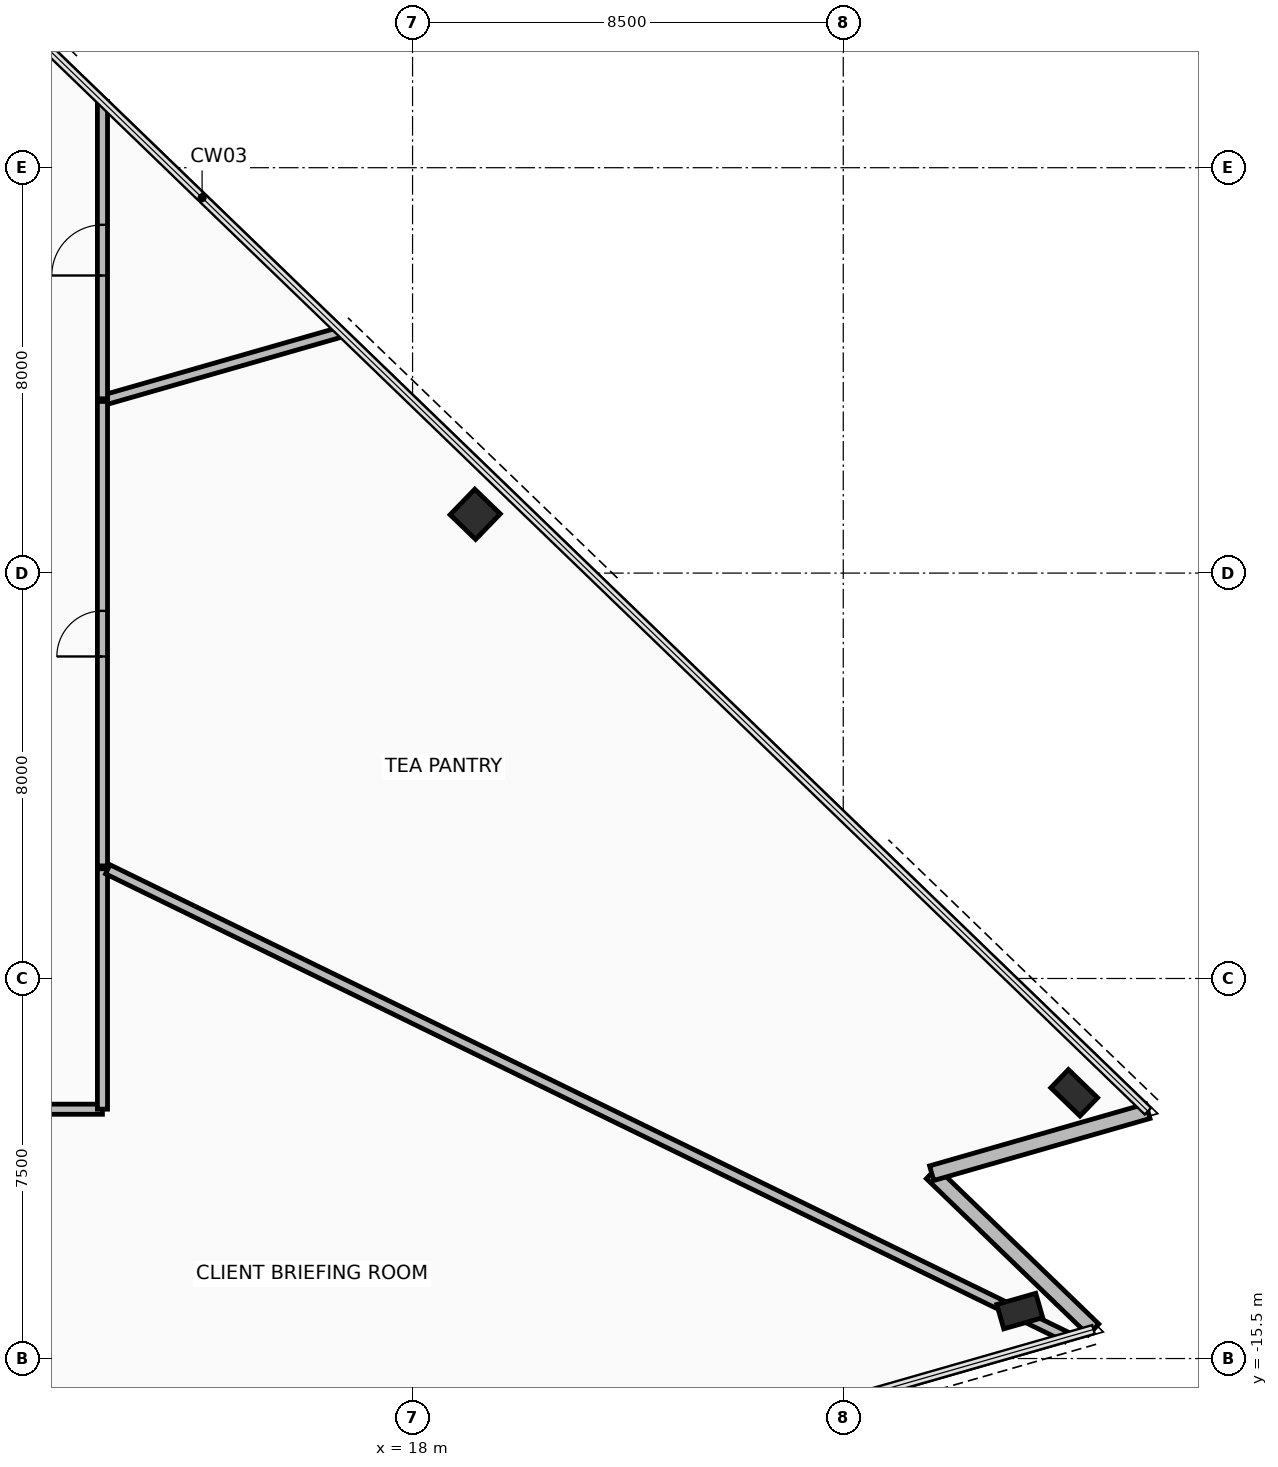
"""IFC4 building model, lengths in metres.
Left out: names, types, materials, properties, quantities, classifications, styles, units other than length and angle.
Written with IfcOpenShell. Run it as: python <this file> out.ifc"""

import sys

from ifc_helpers import new_model, si_unit, direction, frame, frame_2d, origin, origin_2d, place, context, subcontext, project, spatial, rectangle, hollow_rectangle, extrude, element, fill, save


model = new_model("IFC4")
c1 = context("Model", 3, precision=1e-05, world=origin(), true_north=direction((0.0, 1.0)))
c2 = subcontext(c1, "Body", "Model", "MODEL_VIEW")
j1 = project(units=[si_unit("LENGTHUNIT", "METRE"), si_unit("PLANEANGLEUNIT", "RADIAN")], contexts=[c1])
p1 = place(None, origin())
s1 = spatial("IfcSite", under=j1, at=p1, CompositionType="ELEMENT")
p2 = place(p1, origin())
s2 = spatial("IfcBuilding", under=s1, at=p2, CompositionType="ELEMENT")
p3 = place(p2, frame((0.0, 0.0, 86.1)))
s3 = spatial("IfcBuildingStorey", under=s2, at=p3, CompositionType="ELEMENT", Elevation=86.1)
for number, where, z_axis, x_axis in (
    (1, (29.983, -14.564, 0.0), (0.0, 0.0, 1.0), (0.961, 0.276, 0.0)),
    (2, (31.058, -10.256, 0.0), (0.0, 0.0, 1.0), (-0.719, 0.695, 0.0)),
):
    element("IfcColumn", number, at=place(p3, frame(where, z_axis=z_axis, x_axis=x_axis)), inside=s3, PredefinedType="COLUMN", context=c2, shape_type="SweptSolid", body=[
        extrude(hollow_rectangle(XDim=0.5, YDim=0.8, WallThickness=0.04, at=origin_2d()), origin(), (0.0, 0.0, 1.0), 3.6),
    ])
p4 = place(p3, frame((19.236, 1.16, -0.19), z_axis=(0.0, 0.0, 1.0), x_axis=(-0.719339800339, 0.694658370459, 0.0)))
e3 = element("IfcColumn", 3, at=p4, inside=s3, PredefinedType="COLUMN", context=c2, shape_type="SweptSolid", body=[
    extrude(hollow_rectangle(XDim=0.7, YDim=0.7, WallThickness=0.04, at=origin_2d()), origin(), (0.0, 0.0, 1.0), 3.79),
])
p5 = place(p3, frame((31.439, -14.927, 0.0), z_axis=(0.0, 0.0, 1.0), x_axis=(-0.719317126864, 0.694681848763, 0.0)))
e4 = element("IfcWall", 4, at=p5, inside=s3, PredefinedType="STANDARD", context=c2, shape_type="SweptSolid", body=[
    extrude(rectangle(XDim=4.44, YDim=0.3, at=frame_2d((2.22, 0.0))), origin(), (0.0, 0.0, 1.0), 2.605),
])
p6 = place(p3, frame((28.245, -11.842, 0.0), z_axis=(0.0, 0.0, 1.0), x_axis=(0.961255810825, 0.275657878821, 0.0)))
e5 = element("IfcWall", 5, at=p6, inside=s3, PredefinedType="STANDARD", context=c2, shape_type="SweptSolid", body=[
    extrude(rectangle(XDim=4.44, YDim=0.3, at=frame_2d((2.22, 0.0))), origin(), (0.0, 0.0, 1.0), 2.605),
])
p7 = place(p3, frame((16.591, 4.757, 0.0), z_axis=(0.0, 0.0, 1.0), x_axis=(-0.961268012523, -0.275615326314, 0.0)))
e6 = element("IfcWall", 6, at=p7, inside=s3, PredefinedType="PARTITIONING", context=c2, shape_type="SweptSolid", body=[
    extrude(rectangle(XDim=4.867, YDim=0.2, at=frame_2d((2.434, 0.0))), origin(), (0.0, 0.0, 1.0), 2.605),
])
p8 = place(p3, frame((11.88, 3.44, 0.0), z_axis=(0.0, 0.0, 1.0), x_axis=(0.0, 1.0, 0.0)))
e7 = element("IfcWall", 7, at=p8, inside=s3, PredefinedType="PARTITIONING", context=c2, shape_type="SweptSolid", body=[
    extrude(rectangle(XDim=5.867, YDim=0.2, at=frame_2d((2.934, 0.0))), origin(), (0.0, 0.0, 1.0), 2.605),
])
p9 = place(p8, frame((2.433, 0.0, 0.0)))
e8 = element("IfcOpeningElement", 8, at=p9, cuts=e7, PredefinedType="OPENING", context=c2, shape_type="SweptSolid", body=[
    extrude(rectangle(XDim=1.0, YDim=2.15, at=frame_2d((0.5, 1.075))), frame((0.0, 0.11, 0.0), z_axis=(0.0, -1.0, 0.0), x_axis=(1.0, 0.0, 0.0)), (0.0, 0.0, 1.0), 0.22),
])
p10 = place(p3, frame((4.174, -10.58, 0.0), z_axis=(0.0, 0.0, 1.0), x_axis=(1.0, 0.0, 0.0)))
e9 = element("IfcWall", 9, at=p10, inside=s3, PredefinedType="PARTITIONING", context=c2, shape_type="SweptSolid", body=[
    extrude(rectangle(XDim=7.706, YDim=0.2, at=frame_2d((3.853, 0.0))), origin(), (0.0, 0.0, 1.0), 2.805),
])
p11 = place(p10, frame((3.253, 0.0, 0.0)))
e10 = element("IfcOpeningElement", 10, at=p11, cuts=e9, PredefinedType="OPENING", context=c2, shape_type="SweptSolid", body=[
    extrude(rectangle(XDim=1.2, YDim=2.15, at=frame_2d((0.6, 1.075))), frame((0.0, 0.11, 0.0), z_axis=(0.0, -1.0, 0.0), x_axis=(1.0, 0.0, 0.0)), (0.0, 0.0, 1.0), 0.22),
])
p12 = place(p3, frame((11.88, -10.579, 0.0), z_axis=(0.0, 0.0, 1.0), x_axis=(0.0, 1.0, 0.0)))
e11 = element("IfcWall", 11, at=p12, inside=s3, PredefinedType="PARTITIONING", context=c2, shape_type="SweptSolid", body=[
    extrude(rectangle(XDim=4.745, YDim=0.2, at=frame_2d((2.373, 0.0))), origin(), (0.0, 0.0, 1.0), 2.805),
])
p13 = place(p3, frame((11.985, -5.845, 0.0), z_axis=(0.0, 0.0, 1.0), x_axis=(0.898791396377, -0.438376579894, 0.0)))
e12 = element("IfcWall", 12, at=p13, inside=s3, PredefinedType="PARTITIONING", context=c2, shape_type="SweptSolid", body=[
    extrude(rectangle(XDim=21.059, YDim=0.2, at=frame_2d((10.53, 0.0))), origin(), (0.0, 0.0, 1.0), 2.605),
])
p14 = place(p3, frame((11.88, -5.779, 0.0), z_axis=(0.0, 0.0, 1.0), x_axis=(0.0, 1.0, 0.0)))
e13 = element("IfcWall", 13, at=p14, inside=s3, PredefinedType="PARTITIONING", context=c2, shape_type="SweptSolid", body=[
    extrude(rectangle(XDim=9.166, YDim=0.2, at=frame_2d((4.583, 0.0))), origin(), (0.0, 0.0, 1.0), 3.41),
])
p15 = place(p14, frame((4.133, 0.0, 0.0)))
e14 = element("IfcOpeningElement", 14, at=p15, cuts=e13, PredefinedType="OPENING", context=c2, shape_type="SweptSolid", body=[
    extrude(rectangle(XDim=0.9, YDim=2.1, at=frame_2d((0.45, 1.05))), frame((0.0, 0.11, 0.0), z_axis=(0.0, -1.0, 0.0), x_axis=(1.0, 0.0, 0.0)), (0.0, 0.0, 1.0), 0.22),
])
p16 = place(p9, origin())
e15 = element("IfcDoor", 15, at=p16, inside=s3, OperationType="SINGLE_SWING_RIGHT", PredefinedType="DOOR", context=c2, shape_type="SweptSolid", body=[
    extrude(rectangle(XDim=1.0, YDim=2.15, at=frame_2d((0.5, 1.075))), frame((0.0, 0.025, 0.0), z_axis=(0.0, -1.0, 0.0), x_axis=(1.0, 0.0, 0.0)), (0.0, 0.0, 1.0), 0.05),
])
fill(e8, e15)
p17 = place(p15, origin())
e16 = element("IfcDoor", 16, at=p17, inside=s3, OperationType="SINGLE_SWING_LEFT", PredefinedType="DOOR", context=c2, shape_type="SweptSolid", body=[
    extrude(rectangle(XDim=0.9, YDim=2.1, at=frame_2d((0.45, 1.05))), frame((0.0, 0.025, 0.0), z_axis=(0.0, -1.0, 0.0), x_axis=(1.0, 0.0, 0.0)), (0.0, 0.0, 1.0), 0.05),
])
fill(e14, e16)
save(model, sys.argv[1])
